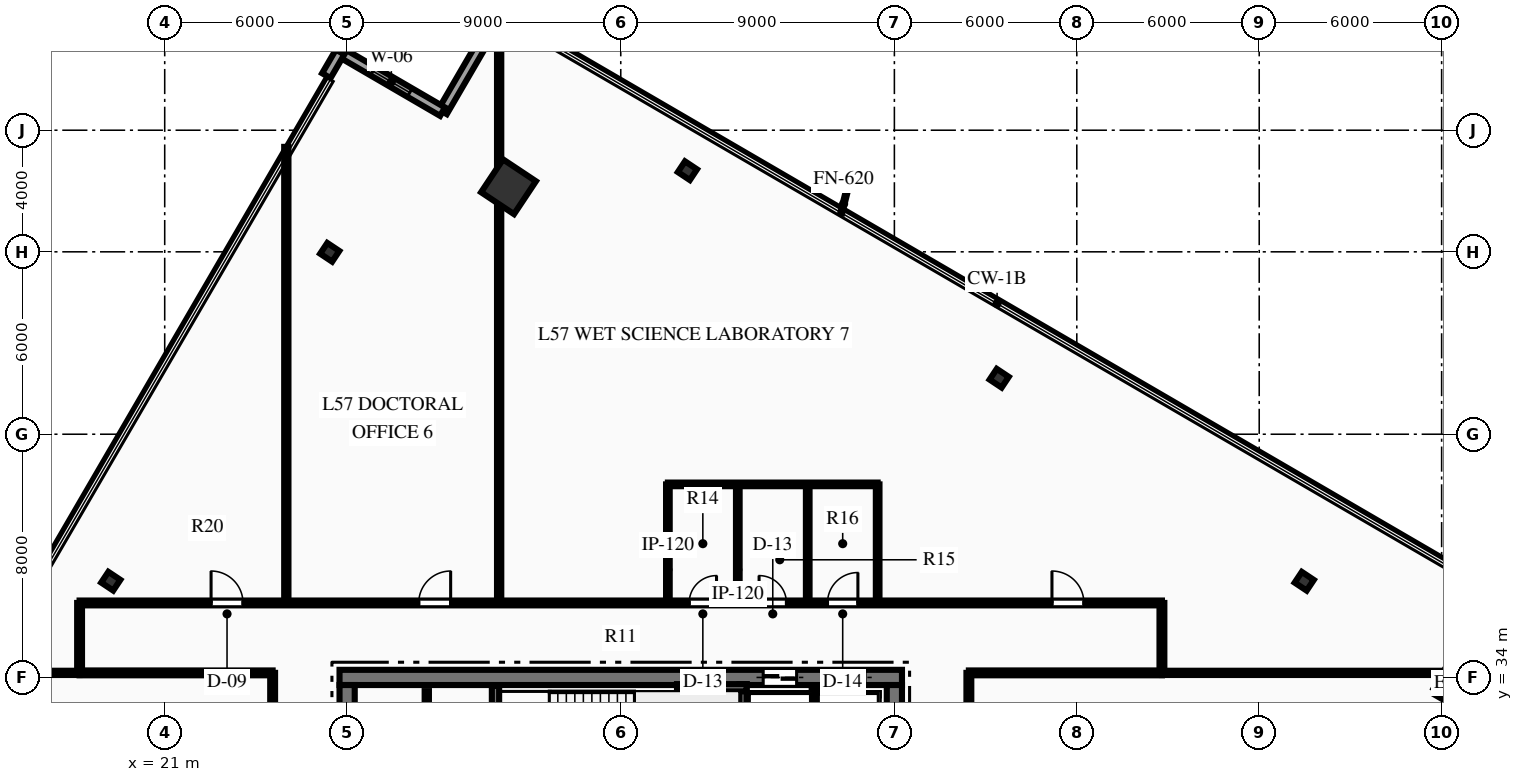
"""IFC4 building model, lengths in metres.
Left out: names, types, materials, properties, quantities, classifications, styles, units other than length and angle.
Written with IfcOpenShell. Run it as: python <this file> out.ifc"""

import sys

from ifc_helpers import new_model, si_unit, direction, frame, frame_2d, origin, origin_2d, place, context, subcontext, project, spatial, rectangle, hollow_rectangle, i_section, extrude, element, fill, save


model = new_model("IFC4")
c1 = context("Model", 3, precision=1e-05, world=origin(), true_north=direction((0.0, 1.0)))
c2 = subcontext(c1, "Body", "Model", "MODEL_VIEW")
j1 = project(units=[si_unit("LENGTHUNIT", "METRE"), si_unit("PLANEANGLEUNIT", "RADIAN")], contexts=[c1])
p1 = place(None, origin())
s1 = spatial("IfcSite", under=j1, at=p1, CompositionType="ELEMENT")
p2 = place(p1, origin())
s2 = spatial("IfcBuilding", under=s1, at=p2, CompositionType="ELEMENT")
p3 = place(p2, frame((0.0, 0.0, 228.45)))
s3 = spatial("IfcBuildingStorey", under=s2, at=p3, CompositionType="ELEMENT", Elevation=228.45)
p4 = place(p3, frame((26.75, 34.0, 0.0), z_axis=(0.0, 0.0, 1.0), x_axis=(1.0, 0.0, 0.0)))
e1 = element("IfcWall", 1, at=p4, inside=s3, PredefinedType="SHEAR", context=c2, shape_type="SweptSolid", body=[
    extrude(rectangle(XDim=18.5, YDim=0.5, at=frame_2d((9.25, 0.0))), origin(), (0.0, 0.0, 1.0), 3.75),
])
p5 = place(p4, frame((13.935, 0.0, 0.0)))
e2 = element("IfcOpeningElement", 2, at=p5, cuts=e1, PredefinedType="OPENING", context=c2, shape_type="SweptSolid", body=[
    extrude(rectangle(XDim=1.1, YDim=2.15, at=frame_2d((0.55, 1.075))), frame((0.0, 0.26, 0.0), z_axis=(0.0, -1.0, 0.0), x_axis=(1.0, 0.0, 0.0)), (0.0, 0.0, 1.0), 0.52),
])
p6 = place(p4, frame((16.185, 0.0, 0.0)))
e3 = element("IfcOpeningElement", 3, at=p6, cuts=e1, PredefinedType="OPENING", context=c2, shape_type="SweptSolid", body=[
    extrude(rectangle(XDim=1.1, YDim=2.15, at=frame_2d((0.55, 1.075))), frame((0.0, 0.26, 0.0), z_axis=(0.0, -1.0, 0.0), x_axis=(1.0, 0.0, 0.0)), (0.0, 0.0, 1.0), 0.52),
])
p7 = place(p3, frame((27.0, 18.25, 0.0), z_axis=(0.0, 0.0, 1.0), x_axis=(0.0, 1.0, 0.0)))
e4 = element("IfcWall", 4, at=p7, inside=s3, PredefinedType="SHEAR", context=c2, shape_type="SweptSolid", body=[
    extrude(rectangle(XDim=15.5, YDim=0.5, at=frame_2d((7.75, 0.0))), origin(), (0.0, 0.0, 1.0), 3.75),
])
p8 = place(p7, frame((9.99, 0.0, 0.0)))
e5 = element("IfcOpeningElement", 5, at=p8, cuts=e4, PredefinedType="OPENING", context=c2, shape_type="SweptSolid", body=[
    extrude(rectangle(XDim=1.4, YDim=2.2, at=frame_2d((0.7, 1.1))), frame((0.0, 0.26, 0.0), z_axis=(0.0, -1.0, 0.0), x_axis=(1.0, 0.0, 0.0)), (0.0, 0.0, 1.0), 0.52),
])
p9 = place(p3, frame((45.0, 18.25, 0.0), z_axis=(0.0, 0.0, 1.0), x_axis=(0.0, 1.0, 0.0)))
e6 = element("IfcWall", 6, at=p9, inside=s3, PredefinedType="SHEAR", context=c2, shape_type="SweptSolid", body=[
    extrude(rectangle(XDim=15.5, YDim=0.5, at=frame_2d((7.75, 0.0))), origin(), (0.0, 0.0, 1.0), 3.75),
])
p10 = place(p9, frame((9.99, 0.0, 0.0)))
e7 = element("IfcOpeningElement", 7, at=p10, cuts=e6, PredefinedType="OPENING", context=c2, shape_type="SweptSolid", body=[
    extrude(rectangle(XDim=1.4, YDim=2.2, at=frame_2d((0.7, 1.1))), frame((0.0, 0.26, 0.0), z_axis=(0.0, -1.0, 0.0), x_axis=(1.0, 0.0, 0.0)), (0.0, 0.0, 1.0), 0.52),
])
p11 = place(p3, frame((31.88, 29.93, 0.0), z_axis=(0.0, 0.0, 1.0), x_axis=(0.0, 1.0, 0.0)))
e8 = element("IfcWall", 8, at=p11, inside=s3, PredefinedType="SHEAR", context=c2, shape_type="SweptSolid", body=[
    extrude(rectangle(XDim=3.79, YDim=0.24, at=frame_2d((1.895, 0.0))), origin(), (0.0, 0.0, 1.0), 3.75),
])
p12 = place(p3, frame((40.02, 29.93, 0.0), z_axis=(0.0, 0.0, 1.0), x_axis=(0.0, 1.0, 0.0)))
e9 = element("IfcWall", 9, at=p12, inside=s3, PredefinedType="SHEAR", context=c2, shape_type="SweptSolid", body=[
    extrude(rectangle(XDim=3.85, YDim=0.24, at=frame_2d((1.925, 0.0))), origin(), (0.0, 0.0, 1.0), 3.75),
])
p13 = place(p3, frame((37.85, 33.66, 0.0), z_axis=(0.0, 0.0, 1.0), x_axis=(1.0, 0.0, 0.0)))
e10 = element("IfcWall", 10, at=p13, inside=s3, PredefinedType="SHEAR", context=c2, shape_type="SweptSolid", body=[
    extrude(rectangle(XDim=2.29, YDim=0.24, at=frame_2d((1.145, 0.0))), origin(), (0.0, 0.0, 1.0), 3.75),
])
p14 = place(p3, frame((32.308, 50.141, 0.0), z_axis=(0.0, 0.0, 1.0), x_axis=(0.554118199338, 0.832437998389, 0.0)))
e11 = element("IfcColumn", 11, at=p14, inside=s3, PredefinedType="COLUMN", context=c2, shape_type="SweptSolid", body=[
    extrude(hollow_rectangle(XDim=1.3, YDim=1.3, WallThickness=0.06, at=origin_2d()), origin(), (0.0, 0.0, 1.0), 3.75),
])
for number, where, z_axis, x_axis in (
    (12, (58.481, 37.164, 0.0), (0.0, 0.0, 1.0), (0.554, 0.832, 0.0)),
    (13, (48.448, 43.842, 0.0), (0.0, 0.0, 1.0), (0.554, 0.832, 0.0)),
    (14, (38.193, 50.668, 0.0), (0.0, 0.0, 1.0), (0.554, 0.832, 0.0)),
    (15, (26.428, 47.984, 0.0), (0.0, 0.0, 1.0), (0.554, 0.832, 0.0)),
    (16, (19.226, 37.166, 0.0), (0.0, 0.0, 1.0), (0.554, 0.832, 0.0)),
):
    element("IfcColumn", number, at=place(p3, frame(where, z_axis=z_axis, x_axis=x_axis)), inside=s3, PredefinedType="COLUMN", context=c2, shape_type="SweptSolid", body=[
        extrude(i_section(OverallWidth=0.424, OverallDepth=0.474, WebThickness=0.048, FlangeThickness=0.077, at=origin_2d()), origin(), (0.0, 0.0, 1.0), 3.75),
    ])
p15 = place(p3, frame((62.874, 33.558, 0.0), z_axis=(0.0, 0.0, 1.0), x_axis=(0.86427115238, -0.503026217174, 0.0)))
e17 = element("IfcWall", 17, at=p15, inside=s3, PredefinedType="STANDARD", context=c2, shape_type="SweptSolid", body=[
    extrude(rectangle(XDim=3.9, YDim=0.32, at=frame_2d((1.95, 0.0))), origin(), (0.0, 0.0, 1.0), 3.47),
])
for number, where, z_axis, x_axis in (
    (18, (64.836, 36.928, 0.0), (0.0, 0.0, 1.0), (-0.503, -0.864, 0.0)),
    (19, (30.14, 52.609, 0.0), (0.0, 0.0, 1.0), (0.503, 0.864, 0.0)),
):
    element("IfcWall", number, at=place(p3, frame(where, z_axis=z_axis, x_axis=x_axis)), inside=s3, PredefinedType="STANDARD", context=c2, shape_type="SweptSolid", body=[
        extrude(rectangle(XDim=3.9, YDim=0.32, at=frame_2d((1.95, 0.0))), origin(), (0.0, 0.0, 1.0), 3.47),
    ])
p16 = place(p3, frame((26.769, 54.571, 0.0), z_axis=(0.0, 0.0, 1.0), x_axis=(0.864255311942, -0.503053432331, 0.0)))
e20 = element("IfcWall", 20, at=p16, inside=s3, PredefinedType="STANDARD", context=c2, shape_type="SweptSolid", body=[
    extrude(rectangle(XDim=3.9, YDim=0.32, at=frame_2d((1.95, 0.0))), origin(), (0.0, 0.0, 1.0), 3.47),
])
p17 = place(p16, frame((1.25, 0.0, 0.85)))
e21 = element("IfcOpeningElement", 21, at=p17, cuts=e20, PredefinedType="OPENING", context=c2, shape_type="SweptSolid", body=[
    extrude(rectangle(XDim=1.4, YDim=2.0, at=frame_2d((0.7, 1.0))), frame((0.0, 0.17, 0.0), z_axis=(0.0, -1.0, 0.0), x_axis=(1.0, 0.0, 0.0)), (0.0, 0.0, 1.0), 0.34),
])
p18 = place(p3, frame((26.316, 53.793, 0.0), z_axis=(0.0, 0.0, 1.0), x_axis=(0.502959906984, 0.86430974307, 0.0)))
e22 = element("IfcWall", 22, at=p18, inside=s3, PredefinedType="STANDARD", context=c2, shape_type="SweptSolid", body=[
    extrude(rectangle(XDim=0.9, YDim=0.32, at=frame_2d((0.45, 0.0))), origin(), (0.0, 0.0, 1.0), 3.47),
])
p19 = place(p3, frame((29.62, 29.95, 0.0), z_axis=(0.0, 0.0, 1.0), x_axis=(0.0, 1.0, 0.0)))
e23 = element("IfcWall", 23, at=p19, inside=s3, PredefinedType="PARTITIONING", context=c2, shape_type="SweptSolid", body=[
    extrude(rectangle(XDim=3.6, YDim=0.14, at=frame_2d((1.8, 0.0))), origin(), (0.0, 0.0, 1.0), 3.47),
])
p20 = place(p3, frame((42.37, 29.9, 0.0), z_axis=(0.0, 0.0, 1.0), x_axis=(0.0, 1.0, 0.0)))
e24 = element("IfcWall", 24, at=p20, inside=s3, PredefinedType="PARTITIONING", context=c2, shape_type="SweptSolid", body=[
    extrude(rectangle(XDim=3.75, YDim=0.18, at=frame_2d((1.875, 0.0))), origin(), (0.0, 0.0, 1.0), 3.47),
])
p21 = place(p3, frame((18.2, 36.45, 0.0), z_axis=(0.0, 0.0, 1.0), x_axis=(1.0, 0.0, 0.0)))
e25 = element("IfcWall", 25, at=p21, inside=s3, PredefinedType="PARTITIONING", context=c2, shape_type="SweptSolid", body=[
    extrude(rectangle(XDim=35.6, YDim=0.16, at=frame_2d((17.8, 0.0))), origin(), (0.0, 0.0, 1.0), 2.849),
])
p22 = place(p21, frame((20.05, 0.0, 0.0)))
e26 = element("IfcOpeningElement", 26, at=p22, cuts=e25, PredefinedType="OPENING", context=c2, shape_type="SweptSolid", body=[
    extrude(rectangle(XDim=0.9, YDim=2.15, at=frame_2d((0.45, 1.075))), frame((0.0, 0.09, 0.0), z_axis=(0.0, -1.0, 0.0), x_axis=(1.0, 0.0, 0.0)), (0.0, 0.0, 1.0), 0.18),
])
p23 = place(p21, frame((22.35, 0.0, 0.0)))
e27 = element("IfcOpeningElement", 27, at=p23, cuts=e25, PredefinedType="OPENING", context=c2, shape_type="SweptSolid", body=[
    extrude(rectangle(XDim=0.9, YDim=2.15, at=frame_2d((0.45, 1.075))), frame((0.0, 0.09, 0.0), z_axis=(0.0, -1.0, 0.0), x_axis=(1.0, 0.0, 0.0)), (0.0, 0.0, 1.0), 0.18),
])
p24 = place(p21, frame((24.6, 0.0, 0.0)))
e28 = element("IfcOpeningElement", 28, at=p24, cuts=e25, PredefinedType="OPENING", context=c2, shape_type="SweptSolid", body=[
    extrude(rectangle(XDim=1.0, YDim=2.15, at=frame_2d((0.5, 1.075))), frame((0.0, 0.09, 0.0), z_axis=(0.0, -1.0, 0.0), x_axis=(1.0, 0.0, 0.0)), (0.0, 0.0, 1.0), 0.18),
])
p25 = place(p21, frame((4.325, 0.0, 0.0)))
e29 = element("IfcOpeningElement", 29, at=p25, cuts=e25, PredefinedType="OPENING", context=c2, shape_type="SweptSolid", body=[
    extrude(rectangle(XDim=1.05, YDim=2.15, at=frame_2d((0.525, 1.075))), frame((0.0, 0.09, 0.0), z_axis=(0.0, -1.0, 0.0), x_axis=(1.0, 0.0, 0.0)), (0.0, 0.0, 1.0), 0.18),
])
p26 = place(p21, frame((11.155, 0.0, 0.0)))
e30 = element("IfcOpeningElement", 30, at=p26, cuts=e25, PredefinedType="OPENING", context=c2, shape_type="SweptSolid", body=[
    extrude(rectangle(XDim=1.05, YDim=2.15, at=frame_2d((0.525, 1.075))), frame((0.0, 0.09, 0.0), z_axis=(0.0, -1.0, 0.0), x_axis=(1.0, 0.0, 0.0)), (0.0, 0.0, 1.0), 0.18),
])
p27 = place(p21, frame((31.983, 0.0, 0.0)))
e31 = element("IfcOpeningElement", 31, at=p27, cuts=e25, PredefinedType="OPENING", context=c2, shape_type="SweptSolid", body=[
    extrude(rectangle(XDim=1.05, YDim=2.15, at=frame_2d((0.525, 1.075))), frame((0.0, 0.09, 0.0), z_axis=(0.0, -1.0, 0.0), x_axis=(1.0, 0.0, 0.0)), (0.0, 0.0, 1.0), 0.18),
])
for number, where, z_axis, x_axis in (
    (32, (18.2, 34.15, 0.0), (0.0, 0.0, 1.0), (1.0, 0.0, 0.0)),
    (33, (47.45, 34.15, 0.0), (0.0, 0.0, 1.0), (1.0, 0.0, 0.0)),
):
    element("IfcWall", number, at=place(p3, frame(where, z_axis=z_axis, x_axis=x_axis)), inside=s3, PredefinedType="PARTITIONING", context=c2, shape_type="SweptSolid", body=[
        extrude(rectangle(XDim=6.35, YDim=0.16, at=frame_2d((3.175, 0.0))), origin(), (0.0, 0.0, 1.0), 3.47),
    ])
p28 = place(p3, frame((24.55, 17.85, 0.0), z_axis=(0.0, 0.0, 1.0), x_axis=(0.0, 1.0, 0.0)))
e34 = element("IfcWall", 34, at=p28, inside=s3, PredefinedType="PARTITIONING", context=c2, shape_type="SweptSolid", body=[
    extrude(rectangle(XDim=16.3, YDim=0.16, at=frame_2d((8.15, 0.0))), origin(), (0.0, 0.0, 1.0), 3.47),
])
p29 = place(p28, frame((5.425, 0.0, 0.0)))
e35 = element("IfcOpeningElement", 35, at=p29, cuts=e34, PredefinedType="OPENING", context=c2, shape_type="SweptSolid", body=[
    extrude(rectangle(XDim=1.05, YDim=2.15, at=frame_2d((0.525, 1.075))), frame((0.0, 0.09, 0.0), z_axis=(0.0, -1.0, 0.0), x_axis=(1.0, 0.0, 0.0)), (0.0, 0.0, 1.0), 0.18),
])
p30 = place(p28, frame((11.367, 0.0, 0.0)))
e36 = element("IfcOpeningElement", 36, at=p30, cuts=e34, PredefinedType="OPENING", context=c2, shape_type="SweptSolid", body=[
    extrude(rectangle(XDim=1.05, YDim=2.15, at=frame_2d((0.525, 1.075))), frame((0.0, 0.09, 0.0), z_axis=(0.0, -1.0, 0.0), x_axis=(1.0, 0.0, 0.0)), (0.0, 0.0, 1.0), 0.18),
])
p31 = place(p3, frame((47.45, 27.25, 0.0), z_axis=(0.0, 0.0, 1.0), x_axis=(0.0, 1.0, 0.0)))
e37 = element("IfcWall", 37, at=p31, inside=s3, PredefinedType="PARTITIONING", context=c2, shape_type="SweptSolid", body=[
    extrude(rectangle(XDim=6.9, YDim=0.16, at=frame_2d((3.45, 0.0))), origin(), (0.0, 0.0, 1.0), 3.47),
])
for number, where, z_axis, x_axis in (
    (38, (18.2, 34.15, 0.0), (0.0, 0.0, 1.0), (0.0, 1.0, 0.0)),
    (39, (53.8, 34.15, 0.0), (0.0, 0.0, 1.0), (0.0, 1.0, 0.0)),
):
    element("IfcWall", number, at=place(p3, frame(where, z_axis=z_axis, x_axis=x_axis)), inside=s3, PredefinedType="PARTITIONING", context=c2, shape_type="SweptSolid", body=[
        extrude(rectangle(XDim=2.3, YDim=0.16, at=frame_2d((1.15, 0.0))), origin(), (0.0, 0.0, 1.0), 3.47),
    ])
for number, where, z_axis, x_axis in (
    (40, (37.55, 36.45, 0.0), (0.0, 0.0, 1.0), (0.0, 1.0, 0.0)),
    (41, (39.85, 36.45, 0.0), (0.0, 0.0, 1.0), (0.0, 1.0, 0.0)),
    (42, (42.15, 36.45, 0.0), (0.0, 0.0, 1.0), (0.0, 1.0, 0.0)),
    (43, (44.45, 36.45, 0.0), (0.0, 0.0, 1.0), (0.0, 1.0, 0.0)),
):
    element("IfcWall", number, at=place(p3, frame(where, z_axis=z_axis, x_axis=x_axis)), inside=s3, PredefinedType="PARTITIONING", context=c2, shape_type="SweptSolid", body=[
        extrude(rectangle(XDim=3.9, YDim=0.12, at=frame_2d((1.95, 0.0))), origin(), (0.0, 0.0, 1.0), 3.47),
    ])
p32 = place(p3, frame((37.55, 40.35, 0.0), z_axis=(0.0, 0.0, 1.0), x_axis=(1.0, 0.0, 0.0)))
e44 = element("IfcWall", 44, at=p32, inside=s3, PredefinedType="PARTITIONING", context=c2, shape_type="SweptSolid", body=[
    extrude(rectangle(XDim=6.9, YDim=0.12, at=frame_2d((3.45, 0.0))), origin(), (0.0, 0.0, 1.0), 3.47),
])
p33 = place(p3, frame((14.93, 34.15, 0.0), z_axis=(0.0, 0.0, 1.0), x_axis=(1.0, 0.0, 0.0)))
e45 = element("IfcWall", 45, at=p33, inside=s3, PredefinedType="PARTITIONING", context=c2, shape_type="SweptSolid", body=[
    extrude(rectangle(XDim=3.27, YDim=0.14, at=frame_2d((1.635, 0.0))), origin(), (0.0, 0.0, 1.0), 3.47),
])
p34 = place(p3, frame((53.8, 34.15, 0.0), z_axis=(0.0, 0.0, 1.0), x_axis=(1.0, 0.0, 0.0)))
e46 = element("IfcWall", 46, at=p34, inside=s3, PredefinedType="PARTITIONING", context=c2, shape_type="SweptSolid", body=[
    extrude(rectangle(XDim=9.373, YDim=0.14, at=frame_2d((4.686, 0.0))), origin(), (0.0, 0.0, 1.0), 3.47),
])
p35 = place(p3, frame((25.0, 36.45, 0.0), z_axis=(0.0, 0.0, 1.0), x_axis=(0.0, 1.0, 0.0)))
e47 = element("IfcWall", 47, at=p35, inside=s3, PredefinedType="PARTITIONING", context=c2, shape_type="SweptSolid", body=[
    extrude(rectangle(XDim=15.002, YDim=0.14, at=frame_2d((7.501, 0.0))), origin(), (0.0, 0.0, 1.0), 3.47),
])
p36 = place(p3, frame((32.0, 36.45, 0.0), z_axis=(0.0, 0.0, 1.0), x_axis=(0.0, 1.0, 0.0)))
e48 = element("IfcWall", 48, at=p36, inside=s3, PredefinedType="PARTITIONING", context=c2, shape_type="SweptSolid", body=[
    extrude(rectangle(XDim=19.276, YDim=0.14, at=frame_2d((9.638, 0.0))), origin(), (0.0, 0.0, 1.0), 2.849),
])
p37 = place(p17, origin())
e49 = element("IfcWindow", 49, at=p37, inside=s3, PartitioningType="SINGLE_PANEL", PredefinedType="WINDOW", context=c2, shape_type="SweptSolid", body=[
    extrude(rectangle(XDim=1.4, YDim=2.0, at=frame_2d((0.7, 1.0))), frame((0.0, 0.03, 0.0), z_axis=(0.0, -1.0, 0.0), x_axis=(1.0, 0.0, 0.0)), (0.0, 0.0, 1.0), 0.06),
])
fill(e21, e49)
p38 = place(p22, origin())
e50 = element("IfcDoor", 50, at=p38, inside=s3, OperationType="SINGLE_SWING_RIGHT", PredefinedType="DOOR", context=c2, shape_type="SweptSolid", body=[
    extrude(rectangle(XDim=0.9, YDim=2.15, at=frame_2d((0.45, 1.075))), frame((0.0, 0.025, 0.0), z_axis=(0.0, -1.0, 0.0), x_axis=(1.0, 0.0, 0.0)), (0.0, 0.0, 1.0), 0.05),
])
fill(e26, e50)
p39 = place(p23, origin())
e51 = element("IfcDoor", 51, at=p39, inside=s3, OperationType="SINGLE_SWING_LEFT", PredefinedType="DOOR", context=c2, shape_type="SweptSolid", body=[
    extrude(rectangle(XDim=0.9, YDim=2.15, at=frame_2d((0.45, 1.075))), frame((0.0, 0.025, 0.0), z_axis=(0.0, -1.0, 0.0), x_axis=(1.0, 0.0, 0.0)), (0.0, 0.0, 1.0), 0.05),
])
fill(e27, e51)
p40 = place(p24, origin())
e52 = element("IfcDoor", 52, at=p40, inside=s3, OperationType="SINGLE_SWING_RIGHT", PredefinedType="DOOR", context=c2, shape_type="SweptSolid", body=[
    extrude(rectangle(XDim=1.0, YDim=2.15, at=frame_2d((0.5, 1.075))), frame((0.0, 0.025, 0.0), z_axis=(0.0, -1.0, 0.0), x_axis=(1.0, 0.0, 0.0)), (0.0, 0.0, 1.0), 0.05),
])
fill(e28, e52)
p41 = place(p25, origin())
e53 = element("IfcDoor", 53, at=p41, inside=s3, OperationType="SINGLE_SWING_LEFT", PredefinedType="DOOR", context=c2, shape_type="SweptSolid", body=[
    extrude(rectangle(XDim=1.05, YDim=2.15, at=frame_2d((0.525, 1.075))), frame((0.0, 0.025, 0.0), z_axis=(0.0, -1.0, 0.0), x_axis=(1.0, 0.0, 0.0)), (0.0, 0.0, 1.0), 0.05),
])
fill(e29, e53)
p42 = place(p26, origin())
e54 = element("IfcDoor", 54, at=p42, inside=s3, OperationType="SINGLE_SWING_RIGHT", PredefinedType="DOOR", context=c2, shape_type="SweptSolid", body=[
    extrude(rectangle(XDim=1.05, YDim=2.15, at=frame_2d((0.525, 1.075))), frame((0.0, 0.025, 0.0), z_axis=(0.0, -1.0, 0.0), x_axis=(1.0, 0.0, 0.0)), (0.0, 0.0, 1.0), 0.05),
])
fill(e30, e54)
p43 = place(p27, origin())
e55 = element("IfcDoor", 55, at=p43, inside=s3, OperationType="SINGLE_SWING_LEFT", PredefinedType="DOOR", context=c2, shape_type="SweptSolid", body=[
    extrude(rectangle(XDim=1.05, YDim=2.15, at=frame_2d((0.525, 1.075))), frame((0.0, 0.025, 0.0), z_axis=(0.0, -1.0, 0.0), x_axis=(1.0, 0.0, 0.0)), (0.0, 0.0, 1.0), 0.05),
])
fill(e31, e55)
p44 = place(p5, origin())
e56 = element("IfcDoor", 56, at=p44, inside=s3, OperationType="SLIDING_TO_LEFT", PredefinedType="DOOR", context=c2, shape_type="SweptSolid", body=[
    extrude(rectangle(XDim=1.1, YDim=2.15, at=frame_2d((0.55, 1.075))), frame((0.0, 0.025, 0.0), z_axis=(0.0, -1.0, 0.0), x_axis=(1.0, 0.0, 0.0)), (0.0, 0.0, 1.0), 0.05),
])
fill(e2, e56)
p45 = place(p6, origin())
e57 = element("IfcDoor", 57, at=p45, inside=s3, OperationType="SLIDING_TO_LEFT", PredefinedType="DOOR", context=c2, shape_type="SweptSolid", body=[
    extrude(rectangle(XDim=1.1, YDim=2.15, at=frame_2d((0.55, 1.075))), frame((0.0, 0.025, 0.0), z_axis=(0.0, -1.0, 0.0), x_axis=(1.0, 0.0, 0.0)), (0.0, 0.0, 1.0), 0.05),
])
fill(e3, e57)
save(model, sys.argv[1])
